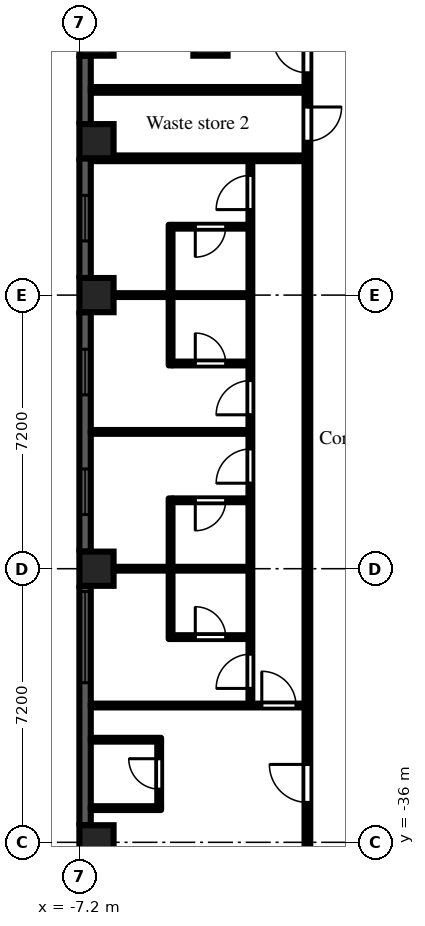
"""IFC4 building model, lengths in metres.
Left out: names, types, materials, properties, quantities, classifications, styles, units other than length and angle.
Written with IfcOpenShell. Run it as: python <this file> out.ifc"""

import sys

from ifc_helpers import new_model, si_unit, direction, frame, frame_2d, origin, origin_2d, place, context, subcontext, project, spatial, rectangle, extrude, element, fill, save


model = new_model("IFC4")
c1 = context("Model", 3, precision=1e-05, world=origin(), true_north=direction((0.0, 1.0)))
c2 = subcontext(c1, "Body", "Model", "MODEL_VIEW")
j1 = project(units=[si_unit("LENGTHUNIT", "METRE"), si_unit("PLANEANGLEUNIT", "RADIAN")], contexts=[c1])
p1 = place(None, origin())
s1 = spatial("IfcSite", under=j1, at=p1, CompositionType="ELEMENT")
p2 = place(p1, origin())
s2 = spatial("IfcBuilding", under=s1, at=p2, CompositionType="ELEMENT")
p3 = place(p2, frame((0.0, 0.0, 108.9)))
s3 = spatial("IfcBuildingStorey", under=s2, at=p3, CompositionType="ELEMENT", Elevation=108.9)
for number, where, z_axis, x_axis in (
    (1, (-6.75, -36.0, 0.0), (0.0, 0.0, 1.0), (1.0, 0.0, 0.0)),
    (2, (-6.75, -28.8, 0.0), (0.0, 0.0, 1.0), (1.0, 0.0, 0.0)),
    (3, (-6.75, -21.6, 0.0), (0.0, 0.0, 1.0), (1.0, 0.0, 0.0)),
    (4, (-6.75, -17.55, 0.0), (0.0, 0.0, 1.0), (1.0, 0.0, 0.0)),
    (5, (-6.75, -14.85, 0.0), (0.0, 0.0, 1.0), (1.0, 0.0, 0.0)),
    (6, (-3.75, -14.85, 0.0), (0.0, 0.0, 1.0), (1.0, 0.0, 0.0)),
):
    element("IfcColumn", number, at=place(p3, frame(where, z_axis=z_axis, x_axis=x_axis)), inside=s3, PredefinedType="COLUMN", context=c2, shape_type="SweptSolid", body=[
        extrude(rectangle(XDim=0.9, YDim=0.9, at=origin_2d()), origin(), (0.0, 0.0, 1.0), 3.0),
    ])
p4 = place(p3, frame((-7.05, -15.3, 0.0), z_axis=(0.0, 0.0, 1.0), x_axis=(0.0, -1.0, 0.0)))
e7 = element("IfcWall", 7, at=p4, inside=s3, PredefinedType="SOLIDWALL", context=c2, shape_type="SweptSolid", body=[
    extrude(rectangle(XDim=1.8, YDim=0.3, at=frame_2d((0.9, 0.0))), origin(), (0.0, 0.0, 1.0), 2.2),
])
p5 = place(p3, frame((-7.05, -18.0, 0.0), z_axis=(0.0, 0.0, 1.0), x_axis=(0.0, -1.0, 0.0)))
e8 = element("IfcWall", 8, at=p5, inside=s3, PredefinedType="SOLIDWALL", context=c2, shape_type="SweptSolid", body=[
    extrude(rectangle(XDim=3.15, YDim=0.3, at=frame_2d((1.575, 0.0))), origin(), (0.0, 0.0, 1.0), 2.2),
])
p6 = place(p5, frame((0.975, 0.0, 0.2)))
e9 = element("IfcOpeningElement", 9, at=p6, cuts=e8, PredefinedType="OPENING", context=c2, shape_type="SweptSolid", body=[
    extrude(rectangle(XDim=1.2, YDim=1.85, at=frame_2d((0.6, 0.925))), frame((0.0, 0.16, 0.0), z_axis=(0.0, -1.0, 0.0), x_axis=(1.0, 0.0, 0.0)), (0.0, 0.0, 1.0), 0.32),
])
p7 = place(p3, frame((-7.05, -22.05, 0.0), z_axis=(0.0, 0.0, 1.0), x_axis=(0.0, -1.0, 0.0)))
e10 = element("IfcWall", 10, at=p7, inside=s3, PredefinedType="SOLIDWALL", context=c2, shape_type="SweptSolid", body=[
    extrude(rectangle(XDim=6.3, YDim=0.3, at=frame_2d((3.15, 0.0))), origin(), (0.0, 0.0, 1.0), 2.2),
])
p8 = place(p7, frame((0.975, 0.0, 0.2)))
e11 = element("IfcOpeningElement", 11, at=p8, cuts=e10, PredefinedType="OPENING", context=c2, shape_type="SweptSolid", body=[
    extrude(rectangle(XDim=1.2, YDim=1.85, at=frame_2d((0.6, 0.925))), frame((0.0, 0.16, 0.0), z_axis=(0.0, -1.0, 0.0), x_axis=(1.0, 0.0, 0.0)), (0.0, 0.0, 1.0), 0.32),
])
p9 = place(p7, frame((4.125, 0.0, 0.2)))
e12 = element("IfcOpeningElement", 12, at=p9, cuts=e10, PredefinedType="OPENING", context=c2, shape_type="SweptSolid", body=[
    extrude(rectangle(XDim=1.2, YDim=1.85, at=frame_2d((0.6, 0.925))), frame((0.0, 0.16, 0.0), z_axis=(0.0, -1.0, 0.0), x_axis=(1.0, 0.0, 0.0)), (0.0, 0.0, 1.0), 0.32),
])
p10 = place(p3, frame((-7.05, -29.25, 0.0), z_axis=(0.0, 0.0, 1.0), x_axis=(0.0, -1.0, 0.0)))
e13 = element("IfcWall", 13, at=p10, inside=s3, PredefinedType="SOLIDWALL", context=c2, shape_type="SweptSolid", body=[
    extrude(rectangle(XDim=6.3, YDim=0.3, at=frame_2d((3.15, 0.0))), origin(), (0.0, 0.0, 1.0), 2.2),
])
p11 = place(p10, frame((0.15, 0.0, 0.2)))
e14 = element("IfcOpeningElement", 14, at=p11, cuts=e13, PredefinedType="OPENING", context=c2, shape_type="SweptSolid", body=[
    extrude(rectangle(XDim=2.4, YDim=1.85, at=frame_2d((1.2, 0.925))), frame((0.0, 0.16, 0.0), z_axis=(0.0, -1.0, 0.0), x_axis=(1.0, 0.0, 0.0)), (0.0, 0.0, 1.0), 0.32),
])
for number, where, z_axis, x_axis in (
    (15, (-6.9, -35.1, 0.0), (0.0, 0.0, 1.0), (1.0, 0.0, 0.0)),
    (16, (-6.9, -33.3, 0.0), (0.0, 0.0, 1.0), (1.0, 0.0, 0.0)),
):
    element("IfcWall", number, at=place(p3, frame(where, z_axis=z_axis, x_axis=x_axis)), inside=s3, PredefinedType="PARTITIONING", context=c2, shape_type="SweptSolid", body=[
        extrude(rectangle(XDim=1.85, YDim=0.1, at=frame_2d((0.925, 0.0))), origin(), (0.0, 0.0, 1.0), 2.55),
    ])
p12 = place(p3, frame((-6.9, -32.4, 0.0), z_axis=(0.0, 0.0, 1.0), x_axis=(1.0, 0.0, 0.0)))
e17 = element("IfcWall", 17, at=p12, inside=s3, PredefinedType="PARTITIONING", context=c2, shape_type="SweptSolid", body=[
    extrude(rectangle(XDim=5.625, YDim=0.1, at=frame_2d((2.812, 0.0))), origin(), (0.0, 0.0, 1.0), 2.55),
])
p13 = place(p12, frame((4.5, 0.0, 0.0)))
e18 = element("IfcOpeningElement", 18, at=p13, cuts=e17, PredefinedType="OPENING", context=c2, shape_type="SweptSolid", body=[
    extrude(rectangle(XDim=0.9, YDim=2.1, at=frame_2d((0.45, 1.05))), frame((0.0, 0.06, 0.0), z_axis=(0.0, -1.0, 0.0), x_axis=(1.0, 0.0, 0.0)), (0.0, 0.0, 1.0), 0.12),
])
for number, where, z_axis, x_axis in (
    (19, (-6.9, -28.8, 0.0), (0.0, 0.0, 1.0), (1.0, 0.0, 0.0)),
    (20, (-6.9, -25.2, 0.0), (0.0, 0.0, 1.0), (1.0, 0.0, 0.0)),
    (21, (-6.9, -21.6, 0.0), (0.0, 0.0, 1.0), (1.0, 0.0, 0.0)),
):
    element("IfcWall", number, at=place(p3, frame(where, z_axis=z_axis, x_axis=x_axis)), inside=s3, PredefinedType="PARTITIONING", context=c2, shape_type="SweptSolid", body=[
        extrude(rectangle(XDim=4.15, YDim=0.1, at=frame_2d((2.075, 0.0))), origin(), (0.0, 0.0, 1.0), 2.55),
    ])
for number, where, z_axis, x_axis in (
    (22, (-6.9, -18.0, 0.0), (0.0, 0.0, 1.0), (1.0, 0.0, 0.0)),
    (23, (-6.9, -16.2, 0.0), (0.0, 0.0, 1.0), (1.0, 0.0, 0.0)),
):
    element("IfcWall", number, at=place(p3, frame(where, z_axis=z_axis, x_axis=x_axis)), inside=s3, PredefinedType="PARTITIONING", context=c2, shape_type="SweptSolid", body=[
        extrude(rectangle(XDim=5.625, YDim=0.15, at=frame_2d((2.812, 0.0))), origin(), (0.0, 0.0, 1.0), 2.55),
    ])
p14 = place(p3, frame((-5.1, -35.05, 0.0), z_axis=(0.0, 0.0, 1.0), x_axis=(0.0, 1.0, 0.0)))
e24 = element("IfcWall", 24, at=p14, inside=s3, PredefinedType="PARTITIONING", context=c2, shape_type="SweptSolid", body=[
    extrude(rectangle(XDim=1.7, YDim=0.1, at=frame_2d((0.85, 0.0))), origin(), (0.0, 0.0, 1.0), 2.55),
])
p15 = place(p14, frame((0.45, 0.0, 0.0)))
e25 = element("IfcOpeningElement", 25, at=p15, cuts=e24, PredefinedType="OPENING", context=c2, shape_type="SweptSolid", body=[
    extrude(rectangle(XDim=0.8, YDim=2.1, at=frame_2d((0.4, 1.05))), frame((0.0, 0.06, 0.0), z_axis=(0.0, -1.0, 0.0), x_axis=(1.0, 0.0, 0.0)), (0.0, 0.0, 1.0), 0.12),
])
p16 = place(p3, frame((-4.8, -30.65, 0.0), z_axis=(0.0, 0.0, 1.0), x_axis=(0.0, 1.0, 0.0)))
e26 = element("IfcWall", 26, at=p16, inside=s3, PredefinedType="PARTITIONING", context=c2, shape_type="SweptSolid", body=[
    extrude(rectangle(XDim=3.7, YDim=0.1, at=frame_2d((1.85, 0.0))), origin(), (0.0, 0.0, 1.0), 2.55),
])
p17 = place(p3, frame((-4.75, -30.6, 0.0), z_axis=(0.0, 0.0, 1.0), x_axis=(1.0, 0.0, 0.0)))
e27 = element("IfcWall", 27, at=p17, inside=s3, PredefinedType="PARTITIONING", context=c2, shape_type="SweptSolid", body=[
    extrude(rectangle(XDim=2.0, YDim=0.1, at=frame_2d((1.0, 0.0))), origin(), (0.0, 0.0, 1.0), 2.55),
])
p18 = place(p17, frame((0.6, 0.0, 0.0)))
e28 = element("IfcOpeningElement", 28, at=p18, cuts=e27, PredefinedType="OPENING", context=c2, shape_type="SweptSolid", body=[
    extrude(rectangle(XDim=0.8, YDim=2.1, at=frame_2d((0.4, 1.05))), frame((0.0, 0.06, 0.0), z_axis=(0.0, -1.0, 0.0), x_axis=(1.0, 0.0, 0.0)), (0.0, 0.0, 1.0), 0.12),
])
p19 = place(p3, frame((-4.75, -27.0, 0.0), z_axis=(0.0, 0.0, 1.0), x_axis=(1.0, 0.0, 0.0)))
e29 = element("IfcWall", 29, at=p19, inside=s3, PredefinedType="PARTITIONING", context=c2, shape_type="SweptSolid", body=[
    extrude(rectangle(XDim=2.0, YDim=0.1, at=frame_2d((1.0, 0.0))), origin(), (0.0, 0.0, 1.0), 2.55),
])
p20 = place(p19, frame((0.6, 0.0, 0.0)))
e30 = element("IfcOpeningElement", 30, at=p20, cuts=e29, PredefinedType="OPENING", context=c2, shape_type="SweptSolid", body=[
    extrude(rectangle(XDim=0.8, YDim=2.1, at=frame_2d((0.4, 1.05))), frame((0.0, 0.06, 0.0), z_axis=(0.0, -1.0, 0.0), x_axis=(1.0, 0.0, 0.0)), (0.0, 0.0, 1.0), 0.12),
])
p21 = place(p3, frame((-4.8, -23.45, 0.0), z_axis=(0.0, 0.0, 1.0), x_axis=(0.0, 1.0, 0.0)))
e31 = element("IfcWall", 31, at=p21, inside=s3, PredefinedType="PARTITIONING", context=c2, shape_type="SweptSolid", body=[
    extrude(rectangle(XDim=3.7, YDim=0.1, at=frame_2d((1.85, 0.0))), origin(), (0.0, 0.0, 1.0), 2.55),
])
p22 = place(p3, frame((-4.75, -23.4, 0.0), z_axis=(0.0, 0.0, 1.0), x_axis=(1.0, 0.0, 0.0)))
e32 = element("IfcWall", 32, at=p22, inside=s3, PredefinedType="PARTITIONING", context=c2, shape_type="SweptSolid", body=[
    extrude(rectangle(XDim=2.0, YDim=0.1, at=frame_2d((1.0, 0.0))), origin(), (0.0, 0.0, 1.0), 2.55),
])
p23 = place(p22, frame((0.6, 0.0, 0.0)))
e33 = element("IfcOpeningElement", 33, at=p23, cuts=e32, PredefinedType="OPENING", context=c2, shape_type="SweptSolid", body=[
    extrude(rectangle(XDim=0.8, YDim=2.1, at=frame_2d((0.4, 1.05))), frame((0.0, 0.06, 0.0), z_axis=(0.0, -1.0, 0.0), x_axis=(1.0, 0.0, 0.0)), (0.0, 0.0, 1.0), 0.12),
])
p24 = place(p3, frame((-4.75, -19.8, 0.0), z_axis=(0.0, 0.0, 1.0), x_axis=(1.0, 0.0, 0.0)))
e34 = element("IfcWall", 34, at=p24, inside=s3, PredefinedType="PARTITIONING", context=c2, shape_type="SweptSolid", body=[
    extrude(rectangle(XDim=2.0, YDim=0.1, at=frame_2d((1.0, 0.0))), origin(), (0.0, 0.0, 1.0), 2.55),
])
p25 = place(p24, frame((0.6, 0.0, 0.0)))
e35 = element("IfcOpeningElement", 35, at=p25, cuts=e34, PredefinedType="OPENING", context=c2, shape_type="SweptSolid", body=[
    extrude(rectangle(XDim=0.8, YDim=2.1, at=frame_2d((0.4, 1.05))), frame((0.0, 0.06, 0.0), z_axis=(0.0, -1.0, 0.0), x_axis=(1.0, 0.0, 0.0)), (0.0, 0.0, 1.0), 0.12),
])
p26 = place(p3, frame((-2.7, -32.35, 0.0), z_axis=(0.0, 0.0, 1.0), x_axis=(0.0, 1.0, 0.0)))
e36 = element("IfcWall", 36, at=p26, inside=s3, PredefinedType="PARTITIONING", context=c2, shape_type="SweptSolid", body=[
    extrude(rectangle(XDim=14.275, YDim=0.1, at=frame_2d((7.138, 0.0))), origin(), (0.0, 0.0, 1.0), 2.55),
])
p27 = place(p26, frame((0.4, 0.0, 0.0)))
e37 = element("IfcOpeningElement", 37, at=p27, cuts=e36, PredefinedType="OPENING", context=c2, shape_type="SweptSolid", body=[
    extrude(rectangle(XDim=0.9, YDim=2.1, at=frame_2d((0.45, 1.05))), frame((0.0, 0.06, 0.0), z_axis=(0.0, -1.0, 0.0), x_axis=(1.0, 0.0, 0.0)), (0.0, 0.0, 1.0), 0.12),
])
p28 = place(p26, frame((5.8, 0.0, 0.0)))
e38 = element("IfcOpeningElement", 38, at=p28, cuts=e36, PredefinedType="OPENING", context=c2, shape_type="SweptSolid", body=[
    extrude(rectangle(XDim=0.9, YDim=2.1, at=frame_2d((0.45, 1.05))), frame((0.0, 0.06, 0.0), z_axis=(0.0, -1.0, 0.0), x_axis=(1.0, 0.0, 0.0)), (0.0, 0.0, 1.0), 0.12),
])
p29 = place(p26, frame((7.6, 0.0, 0.0)))
e39 = element("IfcOpeningElement", 39, at=p29, cuts=e36, PredefinedType="OPENING", context=c2, shape_type="SweptSolid", body=[
    extrude(rectangle(XDim=0.9, YDim=2.1, at=frame_2d((0.45, 1.05))), frame((0.0, 0.06, 0.0), z_axis=(0.0, -1.0, 0.0), x_axis=(1.0, 0.0, 0.0)), (0.0, 0.0, 1.0), 0.12),
])
p30 = place(p26, frame((13.0, 0.0, 0.0)))
e40 = element("IfcOpeningElement", 40, at=p30, cuts=e36, PredefinedType="OPENING", context=c2, shape_type="SweptSolid", body=[
    extrude(rectangle(XDim=0.9, YDim=2.1, at=frame_2d((0.45, 1.05))), frame((0.0, 0.06, 0.0), z_axis=(0.0, -1.0, 0.0), x_axis=(1.0, 0.0, 0.0)), (0.0, 0.0, 1.0), 0.12),
])
p31 = place(p3, frame((-1.2, -36.5, 0.0), z_axis=(0.0, 0.0, 1.0), x_axis=(0.0, 1.0, 0.0)))
e41 = element("IfcWall", 41, at=p31, inside=s3, PredefinedType="PARTITIONING", context=c2, shape_type="SweptSolid", body=[
    extrude(rectangle(XDim=35.225, YDim=0.15, at=frame_2d((17.613, 0.0))), origin(), (0.0, 0.0, 1.0), 2.55),
])
p32 = place(p31, frame((31.85, 0.0, 0.0)))
e42 = element("IfcOpeningElement", 42, at=p32, cuts=e41, PredefinedType="OPENING", context=c2, shape_type="SweptSolid", body=[
    extrude(rectangle(XDim=0.9, YDim=2.1, at=frame_2d((0.45, 1.05))), frame((0.0, 0.085, 0.0), z_axis=(0.0, -1.0, 0.0), x_axis=(1.0, 0.0, 0.0)), (0.0, 0.0, 1.0), 0.17),
])
p33 = place(p31, frame((27.05, 0.0, 0.0)))
e43 = element("IfcOpeningElement", 43, at=p33, cuts=e41, PredefinedType="OPENING", context=c2, shape_type="SweptSolid", body=[
    extrude(rectangle(XDim=0.9, YDim=2.1, at=frame_2d((0.45, 1.05))), frame((0.0, 0.085, 0.0), z_axis=(0.0, -1.0, 0.0), x_axis=(1.0, 0.0, 0.0)), (0.0, 0.0, 1.0), 0.17),
])
p34 = place(p31, frame((20.75, 0.0, 0.0)))
e44 = element("IfcOpeningElement", 44, at=p34, cuts=e41, PredefinedType="OPENING", context=c2, shape_type="SweptSolid", body=[
    extrude(rectangle(XDim=0.9, YDim=2.1, at=frame_2d((0.45, 1.05))), frame((0.0, 0.085, 0.0), z_axis=(0.0, -1.0, 0.0), x_axis=(1.0, 0.0, 0.0)), (0.0, 0.0, 1.0), 0.17),
])
p35 = place(p31, frame((18.95, 0.0, 0.0)))
e45 = element("IfcOpeningElement", 45, at=p35, cuts=e41, PredefinedType="OPENING", context=c2, shape_type="SweptSolid", body=[
    extrude(rectangle(XDim=0.9, YDim=2.1, at=frame_2d((0.45, 1.05))), frame((0.0, 0.085, 0.0), z_axis=(0.0, -1.0, 0.0), x_axis=(1.0, 0.0, 0.0)), (0.0, 0.0, 1.0), 0.17),
])
p36 = place(p31, frame((1.55, 0.0, 0.0)))
e46 = element("IfcOpeningElement", 46, at=p36, cuts=e41, PredefinedType="OPENING", context=c2, shape_type="SweptSolid", body=[
    extrude(rectangle(XDim=1.0, YDim=2.1, at=frame_2d((0.5, 1.05))), frame((0.0, 0.085, 0.0), z_axis=(0.0, -1.0, 0.0), x_axis=(1.0, 0.0, 0.0)), (0.0, 0.0, 1.0), 0.17),
])
p37 = place(p6, origin())
e47 = element("IfcWindow", 47, at=p37, inside=s3, PartitioningType="SINGLE_PANEL", PredefinedType="WINDOW", context=c2, shape_type="SweptSolid", body=[
    extrude(rectangle(XDim=1.2, YDim=1.85, at=frame_2d((0.6, 0.925))), frame((0.0, 0.03, 0.0), z_axis=(0.0, -1.0, 0.0), x_axis=(1.0, 0.0, 0.0)), (0.0, 0.0, 1.0), 0.06),
])
fill(e9, e47)
p38 = place(p8, origin())
e48 = element("IfcWindow", 48, at=p38, inside=s3, PartitioningType="SINGLE_PANEL", PredefinedType="WINDOW", context=c2, shape_type="SweptSolid", body=[
    extrude(rectangle(XDim=1.2, YDim=1.85, at=frame_2d((0.6, 0.925))), frame((0.0, 0.03, 0.0), z_axis=(0.0, -1.0, 0.0), x_axis=(1.0, 0.0, 0.0)), (0.0, 0.0, 1.0), 0.06),
])
fill(e11, e48)
p39 = place(p9, origin())
e49 = element("IfcWindow", 49, at=p39, inside=s3, PartitioningType="SINGLE_PANEL", PredefinedType="WINDOW", context=c2, shape_type="SweptSolid", body=[
    extrude(rectangle(XDim=1.2, YDim=1.85, at=frame_2d((0.6, 0.925))), frame((0.0, 0.03, 0.0), z_axis=(0.0, -1.0, 0.0), x_axis=(1.0, 0.0, 0.0)), (0.0, 0.0, 1.0), 0.06),
])
fill(e12, e49)
p40 = place(p11, origin())
e50 = element("IfcWindow", 50, at=p40, inside=s3, PartitioningType="SINGLE_PANEL", PredefinedType="WINDOW", context=c2, shape_type="SweptSolid", body=[
    extrude(rectangle(XDim=2.4, YDim=1.85, at=frame_2d((1.2, 0.925))), frame((0.0, 0.03, 0.0), z_axis=(0.0, -1.0, 0.0), x_axis=(1.0, 0.0, 0.0)), (0.0, 0.0, 1.0), 0.06),
])
fill(e14, e50)
p41 = place(p34, origin())
e51 = element("IfcDoor", 51, at=p41, inside=s3, OperationType="SINGLE_SWING_RIGHT", PredefinedType="DOOR", context=c2, shape_type="SweptSolid", body=[
    extrude(rectangle(XDim=0.9, YDim=2.1, at=frame_2d((0.45, 1.05))), frame((0.0, 0.025, 0.0), z_axis=(0.0, -1.0, 0.0), x_axis=(1.0, 0.0, 0.0)), (0.0, 0.0, 1.0), 0.05),
])
fill(e44, e51)
p42 = place(p35, frame((0.9, 0.0, 0.0), z_axis=(0.0, 0.0, 1.0), x_axis=(-1.0, 0.0, 0.0)))
e52 = element("IfcDoor", 52, at=p42, inside=s3, OperationType="SINGLE_SWING_LEFT", PredefinedType="DOOR", context=c2, shape_type="SweptSolid", body=[
    extrude(rectangle(XDim=0.9, YDim=2.1, at=frame_2d((0.45, 1.05))), frame((0.0, 0.025, 0.0), z_axis=(0.0, -1.0, 0.0), x_axis=(1.0, 0.0, 0.0)), (0.0, 0.0, 1.0), 0.05),
])
fill(e45, e52)
p43 = place(p15, origin())
e53 = element("IfcDoor", 53, at=p43, inside=s3, OperationType="SINGLE_SWING_RIGHT", PredefinedType="DOOR", context=c2, shape_type="SweptSolid", body=[
    extrude(rectangle(XDim=0.8, YDim=2.1, at=frame_2d((0.4, 1.05))), frame((0.0, 0.025, 0.0), z_axis=(0.0, -1.0, 0.0), x_axis=(1.0, 0.0, 0.0)), (0.0, 0.0, 1.0), 0.05),
])
fill(e25, e53)
p44 = place(p36, origin())
e54 = element("IfcDoor", 54, at=p44, inside=s3, OperationType="SINGLE_SWING_RIGHT", PredefinedType="DOOR", context=c2, shape_type="SweptSolid", body=[
    extrude(rectangle(XDim=1.0, YDim=2.1, at=frame_2d((0.5, 1.05))), frame((0.0, 0.025, 0.0), z_axis=(0.0, -1.0, 0.0), x_axis=(1.0, 0.0, 0.0)), (0.0, 0.0, 1.0), 0.05),
])
fill(e46, e54)
p45 = place(p27, origin())
e55 = element("IfcDoor", 55, at=p45, inside=s3, OperationType="SINGLE_SWING_LEFT", PredefinedType="DOOR", context=c2, shape_type="SweptSolid", body=[
    extrude(rectangle(XDim=0.9, YDim=2.1, at=frame_2d((0.45, 1.05))), frame((0.0, 0.025, 0.0), z_axis=(0.0, -1.0, 0.0), x_axis=(1.0, 0.0, 0.0)), (0.0, 0.0, 1.0), 0.05),
])
fill(e37, e55)
p46 = place(p28, origin())
e56 = element("IfcDoor", 56, at=p46, inside=s3, OperationType="SINGLE_SWING_LEFT", PredefinedType="DOOR", context=c2, shape_type="SweptSolid", body=[
    extrude(rectangle(XDim=0.9, YDim=2.1, at=frame_2d((0.45, 1.05))), frame((0.0, 0.025, 0.0), z_axis=(0.0, -1.0, 0.0), x_axis=(1.0, 0.0, 0.0)), (0.0, 0.0, 1.0), 0.05),
])
fill(e38, e56)
p47 = place(p29, origin())
e57 = element("IfcDoor", 57, at=p47, inside=s3, OperationType="SINGLE_SWING_LEFT", PredefinedType="DOOR", context=c2, shape_type="SweptSolid", body=[
    extrude(rectangle(XDim=0.9, YDim=2.1, at=frame_2d((0.45, 1.05))), frame((0.0, 0.025, 0.0), z_axis=(0.0, -1.0, 0.0), x_axis=(1.0, 0.0, 0.0)), (0.0, 0.0, 1.0), 0.05),
])
fill(e39, e57)
p48 = place(p30, origin())
e58 = element("IfcDoor", 58, at=p48, inside=s3, OperationType="SINGLE_SWING_LEFT", PredefinedType="DOOR", context=c2, shape_type="SweptSolid", body=[
    extrude(rectangle(XDim=0.9, YDim=2.1, at=frame_2d((0.45, 1.05))), frame((0.0, 0.025, 0.0), z_axis=(0.0, -1.0, 0.0), x_axis=(1.0, 0.0, 0.0)), (0.0, 0.0, 1.0), 0.05),
])
fill(e40, e58)
p49 = place(p13, origin())
e59 = element("IfcDoor", 59, at=p49, inside=s3, OperationType="SINGLE_SWING_LEFT", PredefinedType="DOOR", context=c2, shape_type="SweptSolid", body=[
    extrude(rectangle(XDim=0.9, YDim=2.1, at=frame_2d((0.45, 1.05))), frame((0.0, 0.025, 0.0), z_axis=(0.0, -1.0, 0.0), x_axis=(1.0, 0.0, 0.0)), (0.0, 0.0, 1.0), 0.05),
])
fill(e18, e59)
p50 = place(p25, frame((0.8, 0.0, 0.0), z_axis=(0.0, 0.0, 1.0), x_axis=(-1.0, 0.0, 0.0)))
e60 = element("IfcDoor", 60, at=p50, inside=s3, OperationType="SINGLE_SWING_RIGHT", PredefinedType="DOOR", context=c2, shape_type="SweptSolid", body=[
    extrude(rectangle(XDim=0.8, YDim=2.1, at=frame_2d((0.4, 1.05))), frame((0.0, 0.025, 0.0), z_axis=(0.0, -1.0, 0.0), x_axis=(1.0, 0.0, 0.0)), (0.0, 0.0, 1.0), 0.05),
])
fill(e35, e60)
p51 = place(p23, origin())
e61 = element("IfcDoor", 61, at=p51, inside=s3, OperationType="SINGLE_SWING_LEFT", PredefinedType="DOOR", context=c2, shape_type="SweptSolid", body=[
    extrude(rectangle(XDim=0.8, YDim=2.1, at=frame_2d((0.4, 1.05))), frame((0.0, 0.025, 0.0), z_axis=(0.0, -1.0, 0.0), x_axis=(1.0, 0.0, 0.0)), (0.0, 0.0, 1.0), 0.05),
])
fill(e33, e61)
p52 = place(p20, frame((0.8, 0.0, 0.0), z_axis=(0.0, 0.0, 1.0), x_axis=(-1.0, 0.0, 0.0)))
e62 = element("IfcDoor", 62, at=p52, inside=s3, OperationType="SINGLE_SWING_RIGHT", PredefinedType="DOOR", context=c2, shape_type="SweptSolid", body=[
    extrude(rectangle(XDim=0.8, YDim=2.1, at=frame_2d((0.4, 1.05))), frame((0.0, 0.025, 0.0), z_axis=(0.0, -1.0, 0.0), x_axis=(1.0, 0.0, 0.0)), (0.0, 0.0, 1.0), 0.05),
])
fill(e30, e62)
p53 = place(p18, origin())
e63 = element("IfcDoor", 63, at=p53, inside=s3, OperationType="SINGLE_SWING_LEFT", PredefinedType="DOOR", context=c2, shape_type="SweptSolid", body=[
    extrude(rectangle(XDim=0.8, YDim=2.1, at=frame_2d((0.4, 1.05))), frame((0.0, 0.025, 0.0), z_axis=(0.0, -1.0, 0.0), x_axis=(1.0, 0.0, 0.0)), (0.0, 0.0, 1.0), 0.05),
])
fill(e28, e63)
save(model, sys.argv[1])
